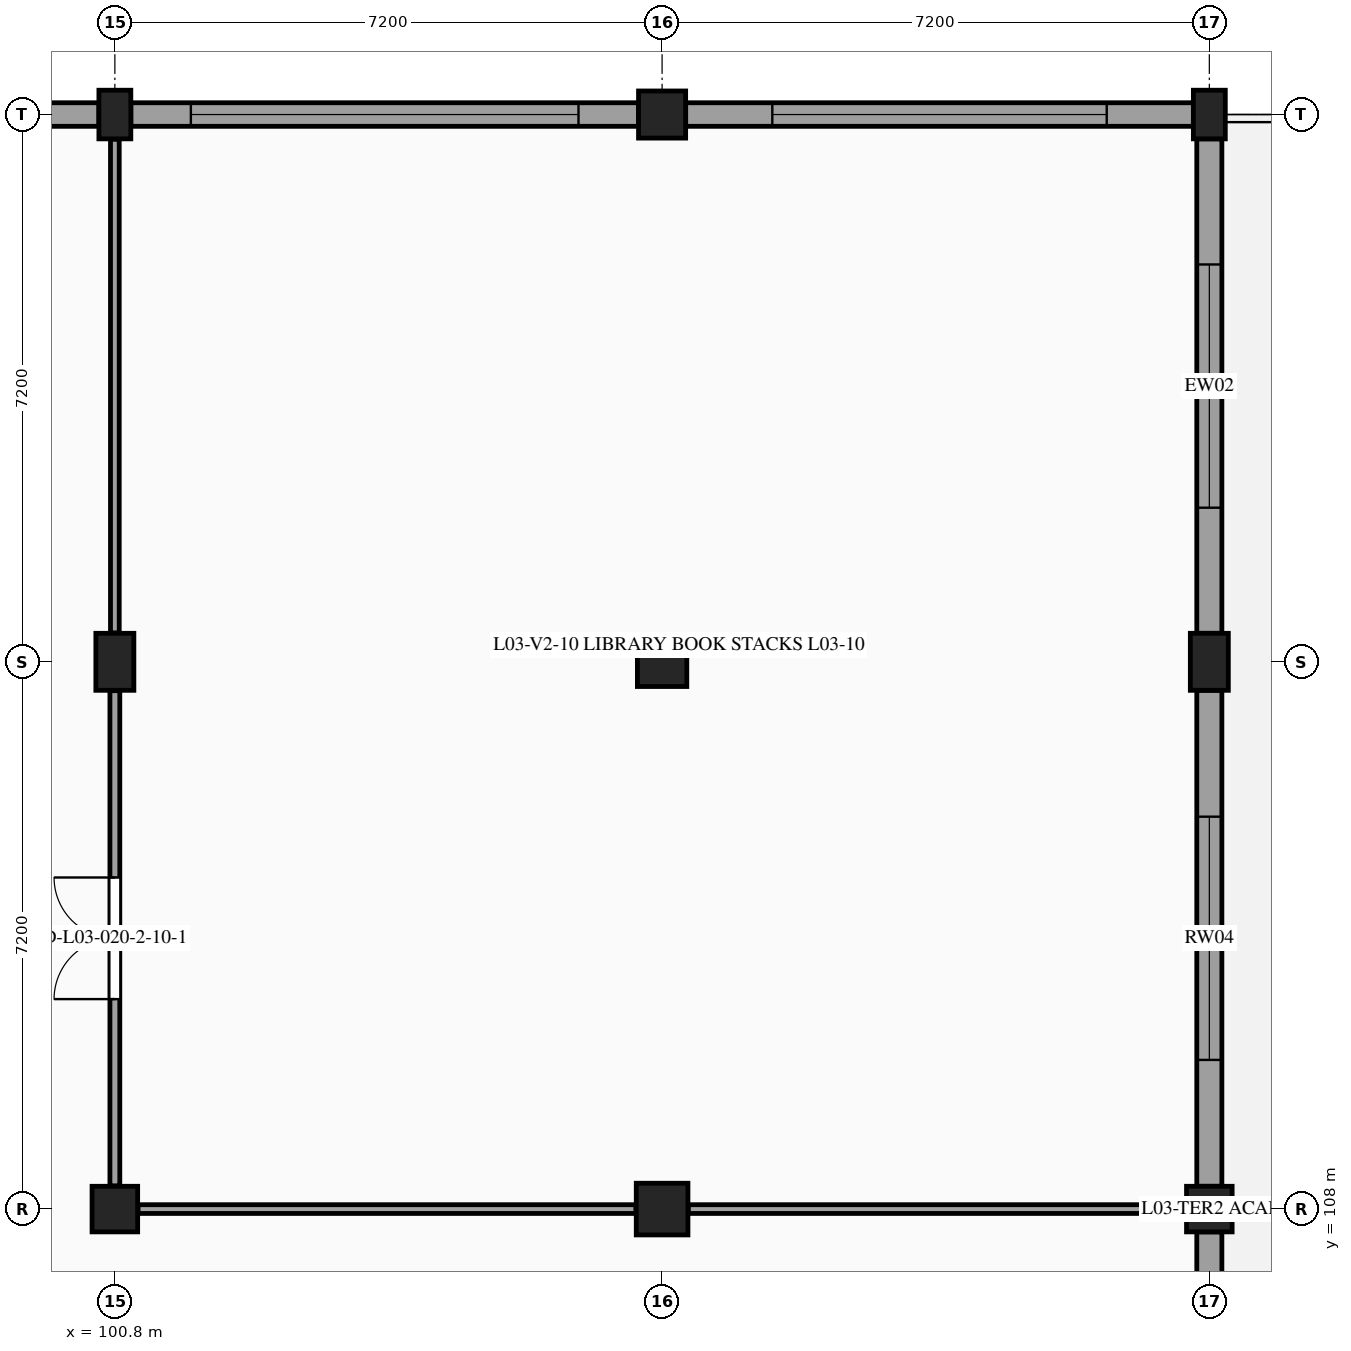
"""IFC4 building model, lengths in metres.
Left out: names, types, materials, properties, quantities, classifications, styles, units other than length and angle.
Written with IfcOpenShell. Run it as: python <this file> out.ifc"""

import sys

from ifc_helpers import new_model, si_unit, direction, frame, frame_2d, origin, origin_2d, place, context, subcontext, project, spatial, rectangle, extrude, element, fill, save


model = new_model("IFC4")
c1 = context("Model", 3, precision=1e-05, world=origin(), true_north=direction((0.0, 1.0)))
c2 = subcontext(c1, "Body", "Model", "MODEL_VIEW")
j1 = project(units=[si_unit("LENGTHUNIT", "METRE"), si_unit("PLANEANGLEUNIT", "RADIAN")], contexts=[c1])
p1 = place(None, origin())
s1 = spatial("IfcSite", under=j1, at=p1, CompositionType="ELEMENT")
p2 = place(p1, origin())
s2 = spatial("IfcBuilding", under=s1, at=p2, CompositionType="ELEMENT")
p3 = place(p2, frame((0.0, 0.0, 14.4)))
s3 = spatial("IfcBuildingStorey", under=s2, at=p3, CompositionType="ELEMENT", Elevation=14.4)
p4 = place(p3, frame((100.8, 108.0, 0.0), z_axis=(0.0, 0.0, 1.0), x_axis=(1.0, 0.0, 0.0)))
e1 = element("IfcColumn", 1, at=p4, inside=s3, PredefinedType="COLUMN", context=c2, shape_type="SweptSolid", body=[
    extrude(rectangle(XDim=0.6, YDim=0.6, at=origin_2d()), origin(), (0.0, 0.0, 1.0), 4.2),
])
p5 = place(p3, frame((100.8, 115.2, 0.0), z_axis=(0.0, 0.0, 1.0), x_axis=(1.0, 0.0, 0.0)))
e2 = element("IfcColumn", 2, at=p5, inside=s3, PredefinedType="COLUMN", context=c2, shape_type="SweptSolid", body=[
    extrude(rectangle(XDim=0.5, YDim=0.75, at=origin_2d()), origin(), (0.0, 0.0, 1.0), 4.2),
])
p6 = place(p3, frame((100.8, 122.4, 0.0), z_axis=(0.0, 0.0, 1.0), x_axis=(1.0, 0.0, 0.0)))
e3 = element("IfcColumn", 3, at=p6, inside=s3, PredefinedType="PILASTER", context=c2, shape_type="SweptSolid", body=[
    extrude(rectangle(XDim=0.42, YDim=0.64, at=origin_2d()), origin(), (0.0, 0.0, 1.0), 4.2),
])
p7 = place(p3, frame((108.0, 108.0, 0.0), z_axis=(0.0, 0.0, 1.0), x_axis=(1.0, 0.0, 0.0)))
e4 = element("IfcColumn", 4, at=p7, inside=s3, PredefinedType="COLUMN", context=c2, shape_type="SweptSolid", body=[
    extrude(rectangle(XDim=0.68, YDim=0.68, at=origin_2d()), origin(), (0.0, 0.0, 1.0), 4.2),
])
p8 = place(p3, frame((108.0, 115.2, 0.0), z_axis=(0.0, 0.0, 1.0), x_axis=(1.0, 0.0, 0.0)))
e5 = element("IfcColumn", 5, at=p8, inside=s3, PredefinedType="COLUMN", context=c2, shape_type="SweptSolid", body=[
    extrude(rectangle(XDim=0.65, YDim=0.65, at=origin_2d()), origin(), (0.0, 0.0, 1.0), 4.2),
])
p9 = place(p3, frame((108.0, 122.4, 0.0), z_axis=(0.0, 0.0, 1.0), x_axis=(1.0, 0.0, 0.0)))
e6 = element("IfcColumn", 6, at=p9, inside=s3, PredefinedType="COLUMN", context=c2, shape_type="SweptSolid", body=[
    extrude(rectangle(XDim=0.62, YDim=0.62, at=origin_2d()), origin(), (0.0, 0.0, 1.0), 4.2),
])
p10 = place(p3, frame((115.2, 108.0, 0.0), z_axis=(0.0, 0.0, 1.0), x_axis=(1.0, 0.0, 0.0)))
e7 = element("IfcColumn", 7, at=p10, inside=s3, PredefinedType="COLUMN", context=c2, shape_type="SweptSolid", body=[
    extrude(rectangle(XDim=0.6, YDim=0.6, at=origin_2d()), origin(), (0.0, 0.0, 1.0), 4.2),
])
p11 = place(p3, frame((115.2, 115.2, 0.0), z_axis=(0.0, 0.0, 1.0), x_axis=(1.0, 0.0, 0.0)))
e8 = element("IfcColumn", 8, at=p11, inside=s3, PredefinedType="COLUMN", context=c2, shape_type="SweptSolid", body=[
    extrude(rectangle(XDim=0.5, YDim=0.75, at=origin_2d()), origin(), (0.0, 0.0, 1.0), 4.2),
])
p12 = place(p3, frame((115.2, 122.4, 0.0), z_axis=(0.0, 0.0, 1.0), x_axis=(1.0, 0.0, 0.0)))
e9 = element("IfcColumn", 9, at=p12, inside=s3, PredefinedType="PILASTER", context=c2, shape_type="SweptSolid", body=[
    extrude(rectangle(XDim=0.42, YDim=0.64, at=origin_2d()), origin(), (0.0, 0.0, 1.0), 4.2),
])
p13 = place(p3, frame((93.91, 122.4, 0.0), z_axis=(0.0, 0.0, 1.0), x_axis=(1.0, 0.0, 0.0)))
e10 = element("IfcWall", 10, at=p13, inside=s3, PredefinedType="STANDARD", context=c2, shape_type="SweptSolid", body=[
    extrude(rectangle(XDim=6.68, YDim=0.31, at=frame_2d((3.34, 0.0))), origin(), (0.0, 0.0, 1.0), 3.16),
])
p14 = place(p13, frame((2.24, 0.0, 0.98)))
e11 = element("IfcOpeningElement", 11, at=p14, cuts=e10, PredefinedType="OPENING", context=c2, shape_type="SweptSolid", body=[
    extrude(rectangle(XDim=2.2, YDim=1.45, at=frame_2d((1.1, 0.725))), frame((0.0, 0.165, 0.0), z_axis=(0.0, -1.0, 0.0), x_axis=(1.0, 0.0, 0.0)), (0.0, 0.0, 1.0), 0.33),
])
p15 = place(p3, frame((101.01, 122.4, 0.0), z_axis=(0.0, 0.0, 1.0), x_axis=(1.0, 0.0, 0.0)))
e12 = element("IfcWall", 12, at=p15, inside=s3, PredefinedType="STANDARD", context=c2, shape_type="SweptSolid", body=[
    extrude(rectangle(XDim=6.68, YDim=0.31, at=frame_2d((3.34, 0.0))), origin(), (0.0, 0.0, 1.0), 3.16),
])
p16 = place(p15, frame((0.79, 0.0, 0.98)))
e13 = element("IfcOpeningElement", 13, at=p16, cuts=e12, PredefinedType="OPENING", context=c2, shape_type="SweptSolid", body=[
    extrude(rectangle(XDim=5.1, YDim=1.75, at=frame_2d((2.55, 0.875))), frame((0.0, 0.165, 0.0), z_axis=(0.0, -1.0, 0.0), x_axis=(1.0, 0.0, 0.0)), (0.0, 0.0, 1.0), 0.33),
])
p17 = place(p3, frame((108.31, 122.4, 0.0), z_axis=(0.0, 0.0, 1.0), x_axis=(1.0, 0.0, 0.0)))
e14 = element("IfcWall", 14, at=p17, inside=s3, PredefinedType="STANDARD", context=c2, shape_type="SweptSolid", body=[
    extrude(rectangle(XDim=6.68, YDim=0.31, at=frame_2d((3.34, 0.0))), origin(), (0.0, 0.0, 1.0), 3.16),
])
p18 = place(p17, frame((1.14, 0.0, 0.98)))
e15 = element("IfcOpeningElement", 15, at=p18, cuts=e14, PredefinedType="OPENING", context=c2, shape_type="SweptSolid", body=[
    extrude(rectangle(XDim=4.4, YDim=1.65, at=frame_2d((2.2, 0.825))), frame((0.0, 0.165, 0.0), z_axis=(0.0, -1.0, 0.0), x_axis=(1.0, 0.0, 0.0)), (0.0, 0.0, 1.0), 0.33),
])
p19 = place(p3, frame((115.2, 122.08, 0.0), z_axis=(0.0, 0.0, 1.0), x_axis=(0.0, -1.0, 0.0)))
e16 = element("IfcWall", 16, at=p19, inside=s3, PredefinedType="STANDARD", context=c2, shape_type="SweptSolid", body=[
    extrude(rectangle(XDim=6.505, YDim=0.33, at=frame_2d((3.252, 0.0))), origin(), (0.0, 0.0, 1.0), 3.11),
])
p20 = place(p19, frame((1.653, 0.0, 0.95)))
e17 = element("IfcOpeningElement", 17, at=p20, cuts=e16, PredefinedType="OPENING", context=c2, shape_type="SweptSolid", body=[
    extrude(rectangle(XDim=3.2, YDim=1.45, at=frame_2d((1.6, 0.725))), frame((0.0, 0.175, 0.0), z_axis=(0.0, -1.0, 0.0), x_axis=(1.0, 0.0, 0.0)), (0.0, 0.0, 1.0), 0.35),
])
p21 = place(p3, frame((115.2, 114.825, 0.0), z_axis=(0.0, 0.0, 1.0), x_axis=(0.0, -1.0, 0.0)))
e18 = element("IfcWall", 18, at=p21, inside=s3, PredefinedType="STANDARD", context=c2, shape_type="SweptSolid", body=[
    extrude(rectangle(XDim=6.525, YDim=0.33, at=frame_2d((3.262, 0.0))), origin(), (0.0, 0.0, 1.0), 3.11),
])
p22 = place(p21, frame((1.663, 0.0, 0.95)))
e19 = element("IfcOpeningElement", 19, at=p22, cuts=e18, PredefinedType="OPENING", context=c2, shape_type="SweptSolid", body=[
    extrude(rectangle(XDim=3.2, YDim=1.45, at=frame_2d((1.6, 0.725))), frame((0.0, 0.175, 0.0), z_axis=(0.0, -1.0, 0.0), x_axis=(1.0, 0.0, 0.0)), (0.0, 0.0, 1.0), 0.35),
])
p23 = place(p3, frame((115.2, 107.7, 0.0), z_axis=(0.0, 0.0, 1.0), x_axis=(0.0, -1.0, 0.0)))
e20 = element("IfcWall", 20, at=p23, inside=s3, PredefinedType="STANDARD", context=c2, shape_type="SweptSolid", body=[
    extrude(rectangle(XDim=6.59, YDim=0.33, at=frame_2d((3.295, 0.0))), origin(), (0.0, 0.0, 1.0), 3.11),
])
p24 = place(p23, frame((1.695, 0.0, 0.95)))
e21 = element("IfcOpeningElement", 21, at=p24, cuts=e20, PredefinedType="OPENING", context=c2, shape_type="SweptSolid", body=[
    extrude(rectangle(XDim=3.2, YDim=1.45, at=frame_2d((1.6, 0.725))), frame((0.0, 0.175, 0.0), z_axis=(0.0, -1.0, 0.0), x_axis=(1.0, 0.0, 0.0)), (0.0, 0.0, 1.0), 0.35),
])
p25 = place(p3, frame((100.8, 108.305, 0.0), z_axis=(0.0, 0.0, 1.0), x_axis=(0.0, 1.0, 0.0)))
e22 = element("IfcWall", 22, at=p25, inside=s3, PredefinedType="PARTITIONING", context=c2, shape_type="SweptSolid", body=[
    extrude(rectangle(XDim=6.515, YDim=0.13, at=frame_2d((3.258, 0.0))), origin(), (0.0, 0.0, 1.0), 3.22),
])
p26 = place(p25, frame((2.458, 0.0, 0.0)))
e23 = element("IfcOpeningElement", 23, at=p26, cuts=e22, PredefinedType="OPENING", context=c2, shape_type="SweptSolid", body=[
    extrude(rectangle(XDim=1.6, YDim=2.2, at=frame_2d((0.8, 1.1))), frame((0.0, 0.075, 0.0), z_axis=(0.0, -1.0, 0.0), x_axis=(1.0, 0.0, 0.0)), (0.0, 0.0, 1.0), 0.15),
])
p27 = place(p3, frame((100.8, 115.58, 0.0), z_axis=(0.0, 0.0, 1.0), x_axis=(0.0, 1.0, 0.0)))
e24 = element("IfcWall", 24, at=p27, inside=s3, PredefinedType="PARTITIONING", context=c2, shape_type="SweptSolid", body=[
    extrude(rectangle(XDim=6.495, YDim=0.115, at=frame_2d((3.248, 0.0))), origin(), (0.0, 0.0, 1.0), 3.22),
])
p28 = place(p3, frame((101.105, 108.0, 0.0), z_axis=(0.0, 0.0, 1.0), x_axis=(1.0, 0.0, 0.0)))
e25 = element("IfcWall", 25, at=p28, inside=s3, PredefinedType="PARTITIONING", context=c2, shape_type="SweptSolid", body=[
    extrude(rectangle(XDim=6.55, YDim=0.115, at=frame_2d((3.275, 0.0))), origin(), (0.0, 0.0, 1.0), 3.265),
])
p29 = place(p3, frame((108.345, 108.0, 0.0), z_axis=(0.0, 0.0, 1.0), x_axis=(1.0, 0.0, 0.0)))
e26 = element("IfcWall", 26, at=p29, inside=s3, PredefinedType="PARTITIONING", context=c2, shape_type="SweptSolid", body=[
    extrude(rectangle(XDim=6.55, YDim=0.115, at=frame_2d((3.275, 0.0))), origin(), (0.0, 0.0, 1.0), 3.275),
])
p30 = place(p16, origin())
e27 = element("IfcWindow", 27, at=p30, inside=s3, PartitioningType="SINGLE_PANEL", PredefinedType="WINDOW", context=c2, shape_type="SweptSolid", body=[
    extrude(rectangle(XDim=5.1, YDim=1.75, at=frame_2d((2.55, 0.875))), frame((0.0, -0.03, 0.0), z_axis=(0.0, -1.0, 0.0), x_axis=(1.0, 0.0, 0.0)), (0.0, 0.0, 1.0), 0.06),
])
fill(e13, e27)
p31 = place(p18, origin())
e28 = element("IfcWindow", 28, at=p31, inside=s3, PartitioningType="SINGLE_PANEL", PredefinedType="WINDOW", context=c2, shape_type="SweptSolid", body=[
    extrude(rectangle(XDim=4.4, YDim=1.65, at=frame_2d((2.2, 0.825))), frame((0.0, -0.03, 0.0), z_axis=(0.0, -1.0, 0.0), x_axis=(1.0, 0.0, 0.0)), (0.0, 0.0, 1.0), 0.06),
])
fill(e15, e28)
p32 = place(p20, origin())
e29 = element("IfcWindow", 29, at=p32, inside=s3, PartitioningType="SINGLE_PANEL", PredefinedType="WINDOW", context=c2, shape_type="SweptSolid", body=[
    extrude(rectangle(XDim=3.2, YDim=1.45, at=frame_2d((1.6, 0.725))), frame((0.0, 0.03, 0.0), z_axis=(0.0, -1.0, 0.0), x_axis=(1.0, 0.0, 0.0)), (0.0, 0.0, 1.0), 0.06),
])
fill(e17, e29)
p33 = place(p22, origin())
e30 = element("IfcWindow", 30, at=p33, inside=s3, PartitioningType="SINGLE_PANEL", PredefinedType="WINDOW", context=c2, shape_type="SweptSolid", body=[
    extrude(rectangle(XDim=3.2, YDim=1.45, at=frame_2d((1.6, 0.725))), frame((0.0, 0.03, 0.0), z_axis=(0.0, -1.0, 0.0), x_axis=(1.0, 0.0, 0.0)), (0.0, 0.0, 1.0), 0.06),
])
fill(e19, e30)
p34 = place(p26, origin())
e31 = element("IfcDoor", 31, at=p34, inside=s3, OperationType="DOUBLE_DOOR_SINGLE_SWING", PredefinedType="DOOR", context=c2, shape_type="SweptSolid", body=[
    extrude(rectangle(XDim=1.6, YDim=2.2, at=frame_2d((0.8, 1.1))), frame((0.0, 0.025, 0.0), z_axis=(0.0, -1.0, 0.0), x_axis=(1.0, 0.0, 0.0)), (0.0, 0.0, 1.0), 0.05),
])
fill(e23, e31)
save(model, sys.argv[1])
